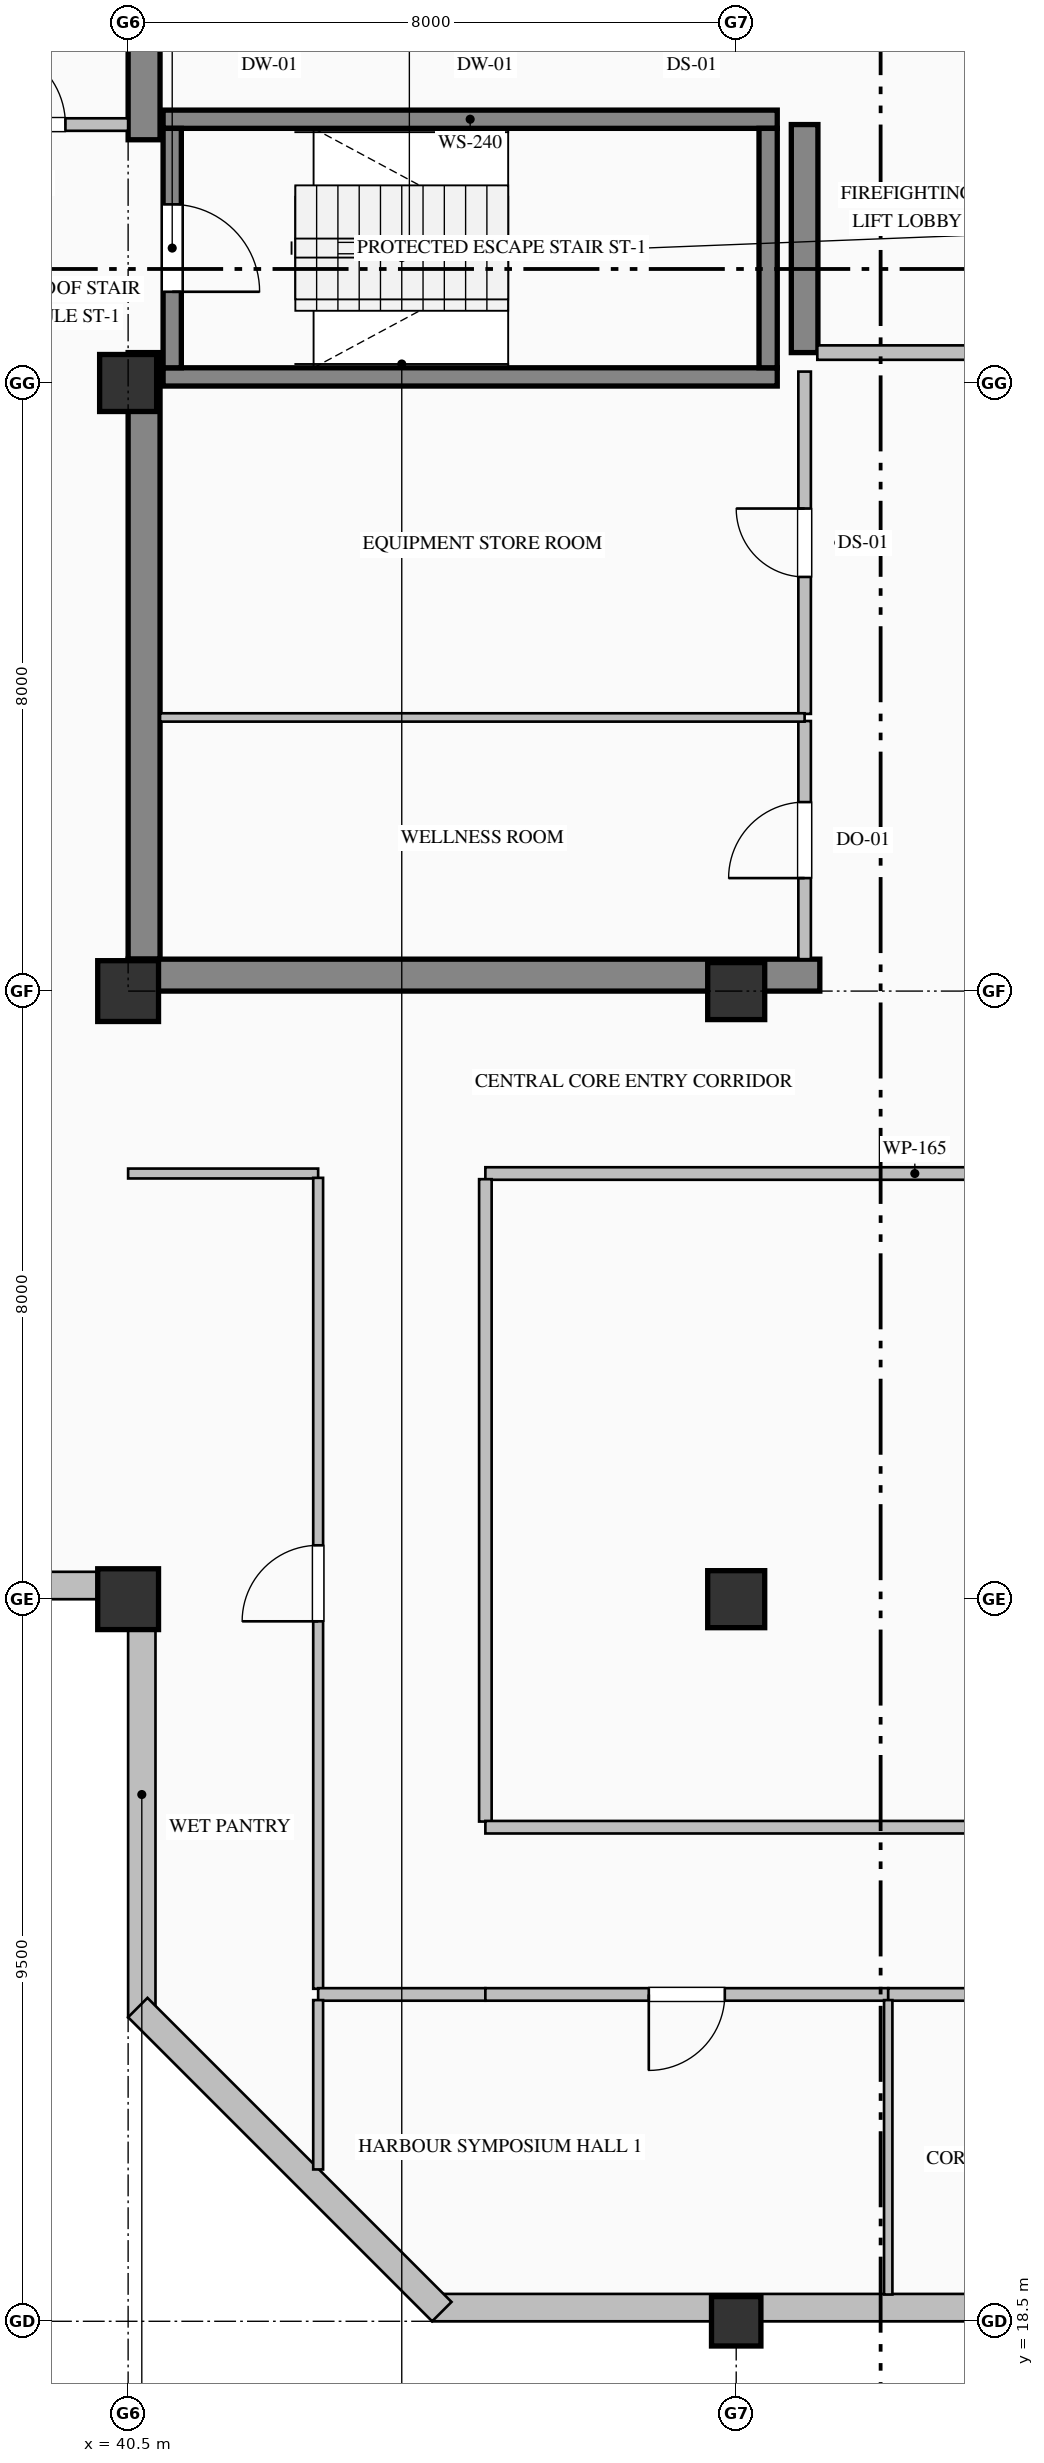
"""IFC4 building model, lengths in metres.
Left out: names, types, materials, properties, quantities, classifications, styles, units other than length and angle.
Written with IfcOpenShell. Run it as: python <this file> out.ifc"""

import sys

from ifc_helpers import new_model, si_unit, direction, frame, frame_2d, origin, origin_2d, place, context, subcontext, project, spatial, rectangle, hollow_rectangle, extrude, element, fill, save


model = new_model("IFC4")
c1 = context("Model", 3, precision=1e-05, world=origin(), true_north=direction((0.0, 1.0)))
c2 = subcontext(c1, "Body", "Model", "MODEL_VIEW")
j1 = project(units=[si_unit("LENGTHUNIT", "METRE"), si_unit("PLANEANGLEUNIT", "RADIAN")], contexts=[c1])
p1 = place(None, origin())
s1 = spatial("IfcSite", under=j1, at=p1, CompositionType="ELEMENT")
p2 = place(p1, origin())
s2 = spatial("IfcBuilding", under=s1, at=p2, CompositionType="ELEMENT")
p3 = place(p2, frame((0.0, 0.0, 319.2)))
s3 = spatial("IfcBuildingStorey", under=s2, at=p3, CompositionType="ELEMENT", Elevation=319.2)
p4 = place(p3, frame((40.71, 36.42, 0.0), z_axis=(0.0, 0.0, 1.0), x_axis=(0.0, 1.0, 0.0)))
e1 = element("IfcWall", 1, at=p4, inside=s3, PredefinedType="SHEAR", context=c2, shape_type="SweptSolid", body=[
    extrude(rectangle(XDim=7.98, YDim=0.42, at=frame_2d((3.99, 0.0))), origin(), (0.0, 0.0, 1.0), 3.785),
])
p5 = place(p3, frame((40.71, 47.2, 0.0), z_axis=(0.0, 0.0, 1.0), x_axis=(0.0, 1.0, 0.0)))
e2 = element("IfcWall", 2, at=p5, inside=s3, PredefinedType="SHEAR", context=c2, shape_type="SweptSolid", body=[
    extrude(rectangle(XDim=4.38, YDim=0.42, at=frame_2d((2.19, 0.0))), origin(), (0.0, 0.0, 1.0), 3.785),
])
p6 = place(p3, frame((40.5, 36.21, 0.0), z_axis=(0.0, 0.0, 1.0), x_axis=(1.0, 0.0, 0.0)))
e3 = element("IfcWall", 3, at=p6, inside=s3, PredefinedType="SHEAR", context=c2, shape_type="SweptSolid", body=[
    extrude(rectangle(XDim=9.1, YDim=0.42, at=frame_2d((4.55, 0.0))), origin(), (0.0, 0.0, 1.0), 3.785),
])
p7 = place(p3, frame((49.4, 44.4, 0.0), z_axis=(0.0, 0.0, 1.0), x_axis=(0.0, 1.0, 0.0)))
e4 = element("IfcWall", 4, at=p7, inside=s3, PredefinedType="SHEAR", context=c2, shape_type="SweptSolid", body=[
    extrude(rectangle(XDim=3.0, YDim=0.35, at=frame_2d((1.5, 0.0))), origin(), (0.0, 0.0, 1.0), 3.785),
])
for number, where, z_axis, x_axis in (
    (5, (40.5, 28.0, 0.0), (0.0, 0.0, 1.0), (1.0, 0.0, 0.0)),
    (6, (40.5, 36.0, 0.0), (0.0, 0.0, 1.0), (1.0, 0.0, 0.0)),
):
    element("IfcColumn", number, at=place(p3, frame(where, z_axis=z_axis, x_axis=x_axis)), inside=s3, PredefinedType="COLUMN", context=c2, shape_type="SweptSolid", body=[
        extrude(hollow_rectangle(XDim=0.8, YDim=0.8, WallThickness=0.032, at=origin_2d()), origin(), (0.0, 0.0, 1.0), 4.0),
    ])
p8 = place(p3, frame((40.5, 44.0, 0.0), z_axis=(0.0, 0.0, 1.0), x_axis=(1.0, 0.0, 0.0)))
e7 = element("IfcColumn", 7, at=p8, inside=s3, PredefinedType="COLUMN", context=c2, shape_type="SweptSolid", body=[
    extrude(rectangle(XDim=0.75, YDim=0.75, at=origin_2d()), origin(), (0.0, 0.0, 1.0), 4.0),
])
p9 = place(p3, frame((48.5, 18.5, 0.0), z_axis=(0.0, 0.0, 1.0), x_axis=(1.0, 0.0, 0.0)))
e8 = element("IfcColumn", 8, at=p9, inside=s3, PredefinedType="COLUMN", context=c2, shape_type="SweptSolid", body=[
    extrude(hollow_rectangle(XDim=0.65, YDim=0.65, WallThickness=0.028, at=origin_2d()), origin(), (0.0, 0.0, 1.0), 4.0),
])
for number, where, z_axis, x_axis in (
    (9, (48.5, 28.0, 0.0), (0.0, 0.0, 1.0), (1.0, 0.0, 0.0)),
    (10, (48.5, 36.0, 0.0), (0.0, 0.0, 1.0), (1.0, 0.0, 0.0)),
):
    element("IfcColumn", number, at=place(p3, frame(where, z_axis=z_axis, x_axis=x_axis)), inside=s3, PredefinedType="COLUMN", context=c2, shape_type="SweptSolid", body=[
        extrude(rectangle(XDim=0.75, YDim=0.75, at=origin_2d()), origin(), (0.0, 0.0, 1.0), 4.0),
    ])
p10 = place(p3, frame((40.68, 22.5, 0.0), z_axis=(0.0, 0.0, 1.0), x_axis=(0.0, 1.0, 0.0)))
e11 = element("IfcWall", 11, at=p10, inside=s3, PredefinedType="SOLIDWALL", context=c2, shape_type="SweptSolid", body=[
    extrude(rectangle(XDim=5.86, YDim=0.36, at=frame_2d((2.93, 0.0))), origin(), (0.0, 0.0, 1.0), 3.185),
])
p11 = place(p3, frame((40.52, 28.18, 0.0), z_axis=(0.0, 0.0, 1.0), x_axis=(-1.0, 0.0, 0.0)))
e12 = element("IfcWall", 12, at=p11, inside=s3, PredefinedType="SOLIDWALL", context=c2, shape_type="SweptSolid", body=[
    extrude(rectangle(XDim=20.02, YDim=0.36, at=frame_2d((10.01, 0.0))), origin(), (0.0, 0.0, 1.0), 3.185),
])
p12 = place(p11, frame((3.125, 0.0, 0.9)))
e13 = element("IfcOpeningElement", 13, at=p12, cuts=e12, PredefinedType="OPENING", context=c2, shape_type="SweptSolid", body=[
    extrude(rectangle(XDim=0.95, YDim=1.85, at=frame_2d((0.475, 0.925))), frame((0.0, 0.19, 0.0), z_axis=(0.0, -1.0, 0.0), x_axis=(1.0, 0.0, 0.0)), (0.0, 0.0, 1.0), 0.38),
])
p13 = place(p11, frame((10.125, 0.0, 0.9)))
e14 = element("IfcOpeningElement", 14, at=p13, cuts=e12, PredefinedType="OPENING", context=c2, shape_type="SweptSolid", body=[
    extrude(rectangle(XDim=1.35, YDim=1.85, at=frame_2d((0.675, 0.925))), frame((0.0, 0.19, 0.0), z_axis=(0.0, -1.0, 0.0), x_axis=(1.0, 0.0, 0.0)), (0.0, 0.0, 1.0), 0.38),
])
p14 = place(p11, frame((13.925, 0.0, 0.9)))
e15 = element("IfcOpeningElement", 15, at=p14, cuts=e12, PredefinedType="OPENING", context=c2, shape_type="SweptSolid", body=[
    extrude(rectangle(XDim=0.95, YDim=1.85, at=frame_2d((0.475, 0.925))), frame((0.0, 0.19, 0.0), z_axis=(0.0, -1.0, 0.0), x_axis=(1.0, 0.0, 0.0)), (0.0, 0.0, 1.0), 0.38),
])
p15 = place(p3, frame((60.0, 18.68, 0.0), z_axis=(0.0, 0.0, 1.0), x_axis=(-1.0, 0.0, 0.0)))
e16 = element("IfcWall", 16, at=p15, inside=s3, PredefinedType="SOLIDWALL", context=c2, shape_type="SweptSolid", body=[
    extrude(rectangle(XDim=15.5, YDim=0.36, at=frame_2d((7.75, 0.0))), origin(), (0.0, 0.0, 1.0), 3.335),
])
p16 = place(p15, frame((6.525, 0.0, 0.9)))
e17 = element("IfcOpeningElement", 17, at=p16, cuts=e16, PredefinedType="OPENING", context=c2, shape_type="SweptSolid", body=[
    extrude(rectangle(XDim=1.35, YDim=1.85, at=frame_2d((0.675, 0.925))), frame((0.0, 0.19, 0.0), z_axis=(0.0, -1.0, 0.0), x_axis=(1.0, 0.0, 0.0)), (0.0, 0.0, 1.0), 0.38),
])
p17 = place(p3, frame((44.627, 18.627, 0.0), z_axis=(0.0, 0.0, 1.0), x_axis=(-0.707106781187, 0.707106781187, 0.0)))
e18 = element("IfcWall", 18, at=p17, inside=s3, PredefinedType="SOLIDWALL", context=c2, shape_type="SweptSolid", body=[
    extrude(rectangle(XDim=5.657, YDim=0.36, at=frame_2d((2.828, 0.0))), origin(), (0.0, 0.0, 1.0), 3.785),
])
for number, where, z_axis, x_axis in (
    (19, (40.96, 47.47, 0.0), (0.0, 0.0, 1.0), (1.0, 0.0, 0.0)),
    (20, (49.04, 44.08, 0.0), (0.0, 0.0, 1.0), (-1.0, 0.0, 0.0)),
):
    element("IfcWall", number, at=place(p3, frame(where, z_axis=z_axis, x_axis=x_axis)), inside=s3, PredefinedType="SOLIDWALL", context=c2, shape_type="SweptSolid", body=[
        extrude(rectangle(XDim=8.08, YDim=0.24, at=frame_2d((4.04, 0.0))), origin(), (0.0, 0.0, 1.0), 4.0),
    ])
p18 = place(p3, frame((41.08, 47.35, 0.0), z_axis=(0.0, 0.0, 1.0), x_axis=(0.0, -1.0, 0.0)))
e21 = element("IfcWall", 21, at=p18, inside=s3, PredefinedType="SOLIDWALL", context=c2, shape_type="SweptSolid", body=[
    extrude(rectangle(XDim=3.15, YDim=0.24, at=frame_2d((1.575, 0.0))), origin(), (0.0, 0.0, 1.0), 4.0),
])
p19 = place(p18, frame((1.0, 0.0, 0.0)))
e22 = element("IfcOpeningElement", 22, at=p19, cuts=e21, PredefinedType="OPENING", context=c2, shape_type="SweptSolid", body=[
    extrude(rectangle(XDim=1.15, YDim=2.2, at=frame_2d((0.575, 1.1))), frame((0.0, 0.13, 0.0), z_axis=(0.0, -1.0, 0.0), x_axis=(1.0, 0.0, 0.0)), (0.0, 0.0, 1.0), 0.26),
])
p20 = place(p3, frame((48.92, 44.2, 0.0), z_axis=(0.0, 0.0, 1.0), x_axis=(0.0, 1.0, 0.0)))
e23 = element("IfcWall", 23, at=p20, inside=s3, PredefinedType="SOLIDWALL", context=c2, shape_type="SweptSolid", body=[
    extrude(rectangle(XDim=3.15, YDim=0.24, at=frame_2d((1.575, 0.0))), origin(), (0.0, 0.0, 1.0), 4.0),
])
p21 = place(p3, frame((37.8, 47.4, 0.0), z_axis=(0.0, 0.0, 1.0), x_axis=(1.0, 0.0, 0.0)))
e24 = element("IfcWall", 24, at=p21, inside=s3, PredefinedType="PARTITIONING", context=c2, shape_type="SweptSolid", body=[
    extrude(rectangle(XDim=2.7, YDim=0.165, at=frame_2d((1.35, 0.0))), origin(), (0.0, 0.0, 1.0), 3.785),
])
p22 = place(p21, frame((0.825, 0.0, 0.0)))
e25 = element("IfcOpeningElement", 25, at=p22, cuts=e24, PredefinedType="OPENING", context=c2, shape_type="SweptSolid", body=[
    extrude(rectangle(XDim=1.05, YDim=2.15, at=frame_2d((0.525, 1.075))), frame((0.0, 0.093, 0.0), z_axis=(0.0, -1.0, 0.0), x_axis=(1.0, 0.0, 0.0)), (0.0, 0.0, 1.0), 0.185),
])
p23 = place(p3, frame((54.733, 44.4, 0.0), z_axis=(0.0, 0.0, 1.0), x_axis=(-1.0, 0.0, 0.0)))
e26 = element("IfcWall", 26, at=p23, inside=s3, PredefinedType="PARTITIONING", context=c2, shape_type="SweptSolid", body=[
    extrude(rectangle(XDim=5.166, YDim=0.19, at=frame_2d((2.583, 0.0))), origin(), (0.0, 0.0, 1.0), 3.785),
])
p24 = place(p23, frame((2.058, 0.0, 0.0)))
e27 = element("IfcOpeningElement", 27, at=p24, cuts=e26, PredefinedType="OPENING", context=c2, shape_type="SweptSolid", body=[
    extrude(rectangle(XDim=1.05, YDim=2.15, at=frame_2d((0.525, 1.075))), frame((0.0, 0.105, 0.0), z_axis=(0.0, -1.0, 0.0), x_axis=(1.0, 0.0, 0.0)), (0.0, 0.0, 1.0), 0.21),
])
p25 = place(p3, frame((49.4, 36.42, 0.0), z_axis=(0.0, 0.0, 1.0), x_axis=(0.0, 1.0, 0.0)))
e28 = element("IfcWall", 28, at=p25, inside=s3, PredefinedType="PARTITIONING", context=c2, shape_type="SweptSolid", body=[
    extrude(rectangle(XDim=3.133, YDim=0.165, at=frame_2d((1.566, 0.0))), origin(), (0.0, 0.0, 1.0), 3.027),
])
p26 = place(p25, frame((1.066, 0.0, 0.0)))
e29 = element("IfcOpeningElement", 29, at=p26, cuts=e28, PredefinedType="OPENING", context=c2, shape_type="SweptSolid", body=[
    extrude(rectangle(XDim=1.0, YDim=2.15, at=frame_2d((0.5, 1.075))), frame((0.0, 0.093, 0.0), z_axis=(0.0, -1.0, 0.0), x_axis=(1.0, 0.0, 0.0)), (0.0, 0.0, 1.0), 0.185),
])
p27 = place(p3, frame((49.4, 39.647, 0.0), z_axis=(0.0, 0.0, 1.0), x_axis=(0.0, 1.0, 0.0)))
e30 = element("IfcWall", 30, at=p27, inside=s3, PredefinedType="PARTITIONING", context=c2, shape_type="SweptSolid", body=[
    extrude(rectangle(XDim=4.503, YDim=0.165, at=frame_2d((2.251, 0.0))), origin(), (0.0, 0.0, 1.0), 3.027),
])
p28 = place(p27, frame((1.802, 0.0, 0.0)))
e31 = element("IfcOpeningElement", 31, at=p28, cuts=e30, PredefinedType="OPENING", context=c2, shape_type="SweptSolid", body=[
    extrude(rectangle(XDim=0.9, YDim=2.15, at=frame_2d((0.45, 1.075))), frame((0.0, 0.093, 0.0), z_axis=(0.0, -1.0, 0.0), x_axis=(1.0, 0.0, 0.0)), (0.0, 0.0, 1.0), 0.185),
])
p29 = place(p3, frame((40.92, 39.6, 0.0), z_axis=(0.0, 0.0, 1.0), x_axis=(1.0, 0.0, 0.0)))
e32 = element("IfcWall", 32, at=p29, inside=s3, PredefinedType="MOVABLE", context=c2, shape_type="SweptSolid", body=[
    extrude(rectangle(XDim=8.48, YDim=0.11, at=frame_2d((4.24, 0.0))), origin(), (0.0, 0.0, 1.0), 3.785),
])
p30 = place(p3, frame((56.5, 33.6, 0.0), z_axis=(0.0, 0.0, 1.0), x_axis=(-1.0, 0.0, 0.0)))
e33 = element("IfcWall", 33, at=p30, inside=s3, PredefinedType="PARTITIONING", context=c2, shape_type="SweptSolid", body=[
    extrude(rectangle(XDim=11.3, YDim=0.165, at=frame_2d((5.65, 0.0))), origin(), (0.0, 0.0, 1.0), 3.785),
])
p31 = place(p3, frame((43.0, 33.6, 0.0), z_axis=(0.0, 0.0, 1.0), x_axis=(-1.0, 0.0, 0.0)))
e34 = element("IfcWall", 34, at=p31, inside=s3, PredefinedType="PARTITIONING", context=c2, shape_type="SweptSolid", body=[
    extrude(rectangle(XDim=2.5, YDim=0.13, at=frame_2d((1.25, 0.0))), origin(), (0.0, 0.0, 1.0), 3.785),
])
p32 = place(p3, frame((45.2, 33.525, 0.0), z_axis=(0.0, 0.0, 1.0), x_axis=(0.0, -1.0, 0.0)))
e35 = element("IfcWall", 35, at=p32, inside=s3, PredefinedType="PARTITIONING", context=c2, shape_type="SweptSolid", body=[
    extrude(rectangle(XDim=8.451, YDim=0.165, at=frame_2d((4.226, 0.0))), origin(), (0.0, 0.0, 1.0), 3.785),
])
p33 = place(p3, frame((43.0, 22.875, 0.0), z_axis=(0.0, 0.0, 1.0), x_axis=(0.0, 1.0, 0.0)))
e36 = element("IfcWall", 36, at=p33, inside=s3, PredefinedType="PARTITIONING", context=c2, shape_type="SweptSolid", body=[
    extrude(rectangle(XDim=10.668, YDim=0.13, at=frame_2d((5.334, 0.0))), origin(), (0.0, 0.0, 1.0), 3.785),
])
p34 = place(p33, frame((4.834, 0.0, 0.0)))
e37 = element("IfcOpeningElement", 37, at=p34, cuts=e36, PredefinedType="OPENING", context=c2, shape_type="SweptSolid", body=[
    extrude(rectangle(XDim=1.0, YDim=2.15, at=frame_2d((0.5, 1.075))), frame((0.0, 0.075, 0.0), z_axis=(0.0, -1.0, 0.0), x_axis=(1.0, 0.0, 0.0)), (0.0, 0.0, 1.0), 0.15),
])
p35 = place(p3, frame((45.2, 22.8, 0.0), z_axis=(0.0, 0.0, 1.0), x_axis=(-1.0, 0.0, 0.0)))
e38 = element("IfcWall", 38, at=p35, inside=s3, PredefinedType="PARTITIONING", context=c2, shape_type="SweptSolid", body=[
    extrude(rectangle(XDim=2.2, YDim=0.165, at=frame_2d((1.1, 0.0))), origin(), (0.0, 0.0, 1.0), 3.785),
])
p36 = place(p3, frame((45.2, 25.0, 0.0), z_axis=(0.0, 0.0, 1.0), x_axis=(1.0, 0.0, 0.0)))
e39 = element("IfcWall", 39, at=p36, inside=s3, PredefinedType="PARTITIONING", context=c2, shape_type="SweptSolid", body=[
    extrude(rectangle(XDim=16.3, YDim=0.165, at=frame_2d((8.15, 0.0))), origin(), (0.0, 0.0, 1.0), 3.785),
])
p37 = place(p36, frame((7.65, 0.0, 0.0)))
e40 = element("IfcOpeningElement", 40, at=p37, cuts=e39, PredefinedType="OPENING", context=c2, shape_type="SweptSolid", body=[
    extrude(rectangle(XDim=1.0, YDim=2.15, at=frame_2d((0.5, 1.075))), frame((0.0, 0.093, 0.0), z_axis=(0.0, -1.0, 0.0), x_axis=(1.0, 0.0, 0.0)), (0.0, 0.0, 1.0), 0.185),
])
p38 = place(p3, frame((50.5, 22.8, 0.0), z_axis=(0.0, 0.0, 1.0), x_axis=(-1.0, 0.0, 0.0)))
e41 = element("IfcWall", 41, at=p38, inside=s3, PredefinedType="PARTITIONING", context=c2, shape_type="SweptSolid", body=[
    extrude(rectangle(XDim=5.3, YDim=0.165, at=frame_2d((2.65, 0.0))), origin(), (0.0, 0.0, 1.0), 3.785),
])
p39 = place(p38, frame((2.15, 0.0, 0.0)))
e42 = element("IfcOpeningElement", 42, at=p39, cuts=e41, PredefinedType="OPENING", context=c2, shape_type="SweptSolid", body=[
    extrude(rectangle(XDim=1.0, YDim=2.15, at=frame_2d((0.5, 1.075))), frame((0.0, 0.093, 0.0), z_axis=(0.0, -1.0, 0.0), x_axis=(1.0, 0.0, 0.0)), (0.0, 0.0, 1.0), 0.185),
])
p40 = place(p3, frame((61.5, 22.8, 0.0), z_axis=(0.0, 0.0, 1.0), x_axis=(-1.0, 0.0, 0.0)))
e43 = element("IfcWall", 43, at=p40, inside=s3, PredefinedType="PARTITIONING", context=c2, shape_type="SweptSolid", body=[
    extrude(rectangle(XDim=11.0, YDim=0.165, at=frame_2d((5.5, 0.0))), origin(), (0.0, 0.0, 1.0), 3.785),
])
p41 = place(p40, frame((5.05, 0.0, 0.0)))
e44 = element("IfcOpeningElement", 44, at=p41, cuts=e43, PredefinedType="OPENING", context=c2, shape_type="SweptSolid", body=[
    extrude(rectangle(XDim=0.9, YDim=2.15, at=frame_2d((0.45, 1.075))), frame((0.0, 0.093, 0.0), z_axis=(0.0, -1.0, 0.0), x_axis=(1.0, 0.0, 0.0)), (0.0, 0.0, 1.0), 0.185),
])
p42 = place(p3, frame((43.0, 22.726, 0.0), z_axis=(0.0, 0.0, 1.0), x_axis=(0.0, -1.0, 0.0)))
e45 = element("IfcWall", 45, at=p42, inside=s3, PredefinedType="PARTITIONING", context=c2, shape_type="SweptSolid", body=[
    extrude(rectangle(XDim=2.228, YDim=0.13, at=frame_2d((1.114, 0.0))), origin(), (0.0, 0.0, 1.0), 3.785),
])
p43 = place(p3, frame((50.5, 22.726, 0.0), z_axis=(0.0, 0.0, 1.0), x_axis=(0.0, -1.0, 0.0)))
e46 = element("IfcWall", 46, at=p43, inside=s3, PredefinedType="MOVABLE", context=c2, shape_type="SweptSolid", body=[
    extrude(rectangle(XDim=3.874, YDim=0.11, at=frame_2d((1.937, 0.0))), origin(), (0.0, 0.0, 1.0), 3.785),
])
p44 = place(p19, origin())
e47 = element("IfcDoor", 47, at=p44, inside=s3, OperationType="SINGLE_SWING_RIGHT", PredefinedType="DOOR", context=c2, shape_type="SweptSolid", body=[
    extrude(rectangle(XDim=1.15, YDim=2.2, at=frame_2d((0.575, 1.1))), frame((0.0, 0.025, 0.0), z_axis=(0.0, -1.0, 0.0), x_axis=(1.0, 0.0, 0.0)), (0.0, 0.0, 1.0), 0.05),
])
fill(e22, e47)
p45 = place(p22, origin())
e48 = element("IfcDoor", 48, at=p45, inside=s3, OperationType="SINGLE_SWING_LEFT", PredefinedType="DOOR", context=c2, shape_type="SweptSolid", body=[
    extrude(rectangle(XDim=1.05, YDim=2.15, at=frame_2d((0.525, 1.075))), frame((0.0, 0.025, 0.0), z_axis=(0.0, -1.0, 0.0), x_axis=(1.0, 0.0, 0.0)), (0.0, 0.0, 1.0), 0.05),
])
fill(e25, e48)
p46 = place(p26, origin())
e49 = element("IfcDoor", 49, at=p46, inside=s3, OperationType="SINGLE_SWING_LEFT", PredefinedType="DOOR", context=c2, shape_type="SweptSolid", body=[
    extrude(rectangle(XDim=1.0, YDim=2.15, at=frame_2d((0.5, 1.075))), frame((0.0, 0.025, 0.0), z_axis=(0.0, -1.0, 0.0), x_axis=(1.0, 0.0, 0.0)), (0.0, 0.0, 1.0), 0.05),
])
fill(e29, e49)
p47 = place(p28, origin())
e50 = element("IfcDoor", 50, at=p47, inside=s3, OperationType="SINGLE_SWING_RIGHT", PredefinedType="DOOR", context=c2, shape_type="SweptSolid", body=[
    extrude(rectangle(XDim=0.9, YDim=2.15, at=frame_2d((0.45, 1.075))), frame((0.0, 0.025, 0.0), z_axis=(0.0, -1.0, 0.0), x_axis=(1.0, 0.0, 0.0)), (0.0, 0.0, 1.0), 0.05),
])
fill(e31, e50)
p48 = place(p34, origin())
e51 = element("IfcDoor", 51, at=p48, inside=s3, OperationType="SINGLE_SWING_LEFT", PredefinedType="DOOR", context=c2, shape_type="SweptSolid", body=[
    extrude(rectangle(XDim=1.0, YDim=2.15, at=frame_2d((0.5, 1.075))), frame((0.0, 0.025, 0.0), z_axis=(0.0, -1.0, 0.0), x_axis=(1.0, 0.0, 0.0)), (0.0, 0.0, 1.0), 0.05),
])
fill(e37, e51)
p49 = place(p39, origin())
e52 = element("IfcDoor", 52, at=p49, inside=s3, OperationType="SINGLE_SWING_RIGHT", PredefinedType="DOOR", context=c2, shape_type="SweptSolid", body=[
    extrude(rectangle(XDim=1.0, YDim=2.15, at=frame_2d((0.5, 1.075))), frame((0.0, 0.025, 0.0), z_axis=(0.0, -1.0, 0.0), x_axis=(1.0, 0.0, 0.0)), (0.0, 0.0, 1.0), 0.05),
])
fill(e42, e52)
save(model, sys.argv[1])
